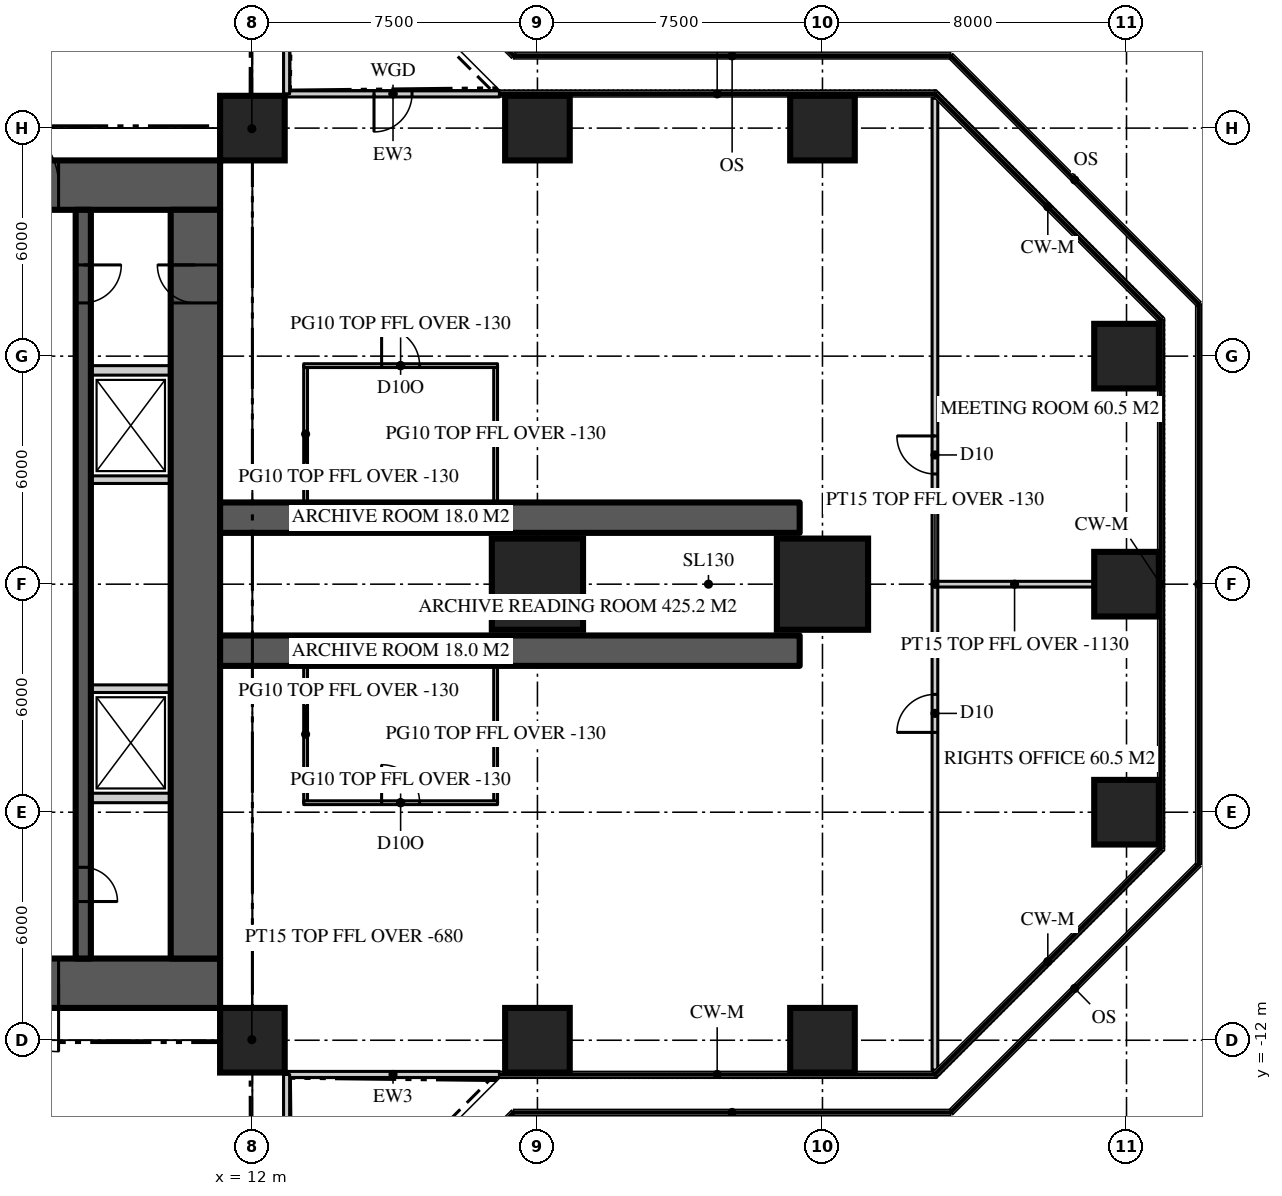
"""IFC4 building model, lengths in metres.
Left out: names, types, materials, properties, quantities, classifications, styles, units other than length and angle.
Written with IfcOpenShell. Run it as: python <this file> out.ifc"""

import sys

from ifc_helpers import new_model, si_unit, direction, frame, frame_2d, origin, origin_2d, place, context, subcontext, project, spatial, rectangle, extrude, element, fill, save


model = new_model("IFC4")
c1 = context("Model", 3, precision=1e-05, world=origin(), true_north=direction((0.0, 1.0)))
c2 = subcontext(c1, "Body", "Model", "MODEL_VIEW")
j1 = project(units=[si_unit("LENGTHUNIT", "METRE"), si_unit("PLANEANGLEUNIT", "RADIAN")], contexts=[c1])
p1 = place(None, origin())
s1 = spatial("IfcSite", under=j1, at=p1, CompositionType="ELEMENT")
p2 = place(p1, origin())
s2 = spatial("IfcBuilding", under=s1, at=p2, CompositionType="ELEMENT")
p3 = place(p2, frame((0.0, 0.0, 167.1)))
s3 = spatial("IfcBuildingStorey", under=s2, at=p3, CompositionType="ELEMENT", Elevation=167.1)
p4 = place(p3, frame((-11.15, 10.5, 0.0), z_axis=(0.0, 0.0, 1.0), x_axis=(1.0, 0.0, 0.0)))
e1 = element("IfcWall", 1, at=p4, inside=s3, PredefinedType="SHEAR", context=c2, shape_type="SweptSolid", body=[
    extrude(rectangle(XDim=22.3, YDim=1.3, at=frame_2d((11.15, 0.0))), origin(), (0.0, 0.0, 1.0), 3.9),
])
p5 = place(p4, frame((4.25, 0.0, 0.0)))
e2 = element("IfcOpeningElement", 2, at=p5, cuts=e1, PredefinedType="OPENING", context=c2, shape_type="SweptSolid", body=[
    extrude(rectangle(XDim=1.8, YDim=2.2, at=frame_2d((0.9, 1.1))), frame((0.0, 0.66, 0.0), z_axis=(0.0, -1.0, 0.0), x_axis=(1.0, 0.0, 0.0)), (0.0, 0.0, 1.0), 1.32),
])
p6 = place(p4, frame((16.25, 0.0, 0.0)))
e3 = element("IfcOpeningElement", 3, at=p6, cuts=e1, PredefinedType="OPENING", context=c2, shape_type="SweptSolid", body=[
    extrude(rectangle(XDim=1.8, YDim=2.2, at=frame_2d((0.9, 1.1))), frame((0.0, 0.66, 0.0), z_axis=(0.0, -1.0, 0.0), x_axis=(1.0, 0.0, 0.0)), (0.0, 0.0, 1.0), 1.32),
])
p7 = place(p3, frame((11.15, -10.5, 0.0), z_axis=(0.0, 0.0, 1.0), x_axis=(-1.0, 0.0, 0.0)))
e4 = element("IfcWall", 4, at=p7, inside=s3, PredefinedType="SHEAR", context=c2, shape_type="SweptSolid", body=[
    extrude(rectangle(XDim=22.3, YDim=1.3, at=frame_2d((11.15, 0.0))), origin(), (0.0, 0.0, 1.0), 3.9),
])
p8 = place(p7, frame((16.25, 0.0, 0.0)))
e5 = element("IfcOpeningElement", 5, at=p8, cuts=e4, PredefinedType="OPENING", context=c2, shape_type="SweptSolid", body=[
    extrude(rectangle(XDim=1.8, YDim=2.2, at=frame_2d((0.9, 1.1))), frame((0.0, 0.66, 0.0), z_axis=(0.0, -1.0, 0.0), x_axis=(1.0, 0.0, 0.0)), (0.0, 0.0, 1.0), 1.32),
])
p9 = place(p7, frame((4.25, 0.0, 0.0)))
e6 = element("IfcOpeningElement", 6, at=p9, cuts=e4, PredefinedType="OPENING", context=c2, shape_type="SweptSolid", body=[
    extrude(rectangle(XDim=1.8, YDim=2.2, at=frame_2d((0.9, 1.1))), frame((0.0, 0.66, 0.0), z_axis=(0.0, -1.0, 0.0), x_axis=(1.0, 0.0, 0.0)), (0.0, 0.0, 1.0), 1.32),
])
p10 = place(p3, frame((10.5, -9.85, 0.0), z_axis=(0.0, 0.0, 1.0), x_axis=(0.0, 1.0, 0.0)))
e7 = element("IfcWall", 7, at=p10, inside=s3, PredefinedType="SHEAR", context=c2, shape_type="SweptSolid", body=[
    extrude(rectangle(XDim=19.7, YDim=1.3, at=frame_2d((9.85, 0.0))), origin(), (0.0, 0.0, 1.0), 3.9),
])
p11 = place(p10, frame((17.25, 0.0, 0.0)))
e8 = element("IfcOpeningElement", 8, at=p11, cuts=e7, PredefinedType="OPENING", context=c2, shape_type="SweptSolid", body=[
    extrude(rectangle(XDim=1.0, YDim=2.2, at=frame_2d((0.5, 1.1))), frame((0.0, 0.66, 0.0), z_axis=(0.0, -1.0, 0.0), x_axis=(1.0, 0.0, 0.0)), (0.0, 0.0, 1.0), 1.32),
])
for number, where, z_axis, x_axis in (
    (9, (11.15, -1.75, 0.0), (0.0, 0.0, 1.0), (1.0, 0.0, 0.0)),
    (10, (11.15, 1.75, 0.0), (0.0, 0.0, 1.0), (1.0, 0.0, 0.0)),
):
    element("IfcWall", number, at=place(p3, frame(where, z_axis=z_axis, x_axis=x_axis)), inside=s3, PredefinedType="SHEAR", context=c2, shape_type="SweptSolid", body=[
        extrude(rectangle(XDim=15.25, YDim=0.8, at=frame_2d((7.625, 0.0))), origin(), (0.0, 0.0, 1.0), 3.9),
    ])
for number, where, z_axis, x_axis in (
    (11, (12.0, -12.0, 0.0), (0.0, 0.0, 1.0), (1.0, 0.0, 0.0)),
    (12, (19.5, -12.0, 0.0), (0.0, 0.0, 1.0), (1.0, 0.0, 0.0)),
    (13, (27.0, -12.0, 0.0), (0.0, 0.0, 1.0), (1.0, 0.0, 0.0)),
    (14, (35.0, -6.0, 0.0), (0.0, 0.0, 1.0), (1.0, 0.0, 0.0)),
):
    element("IfcColumn", number, at=place(p3, frame(where, z_axis=z_axis, x_axis=x_axis)), inside=s3, PredefinedType="COLUMN", context=c2, shape_type="SweptSolid", body=[
        extrude(rectangle(XDim=1.7, YDim=1.7, at=origin_2d()), origin(), (0.0, 0.0, 1.0), 3.9),
    ])
for number, where, z_axis, x_axis in (
    (15, (19.5, 0.0, 0.0), (0.0, 0.0, 1.0), (1.0, 0.0, 0.0)),
    (16, (27.0, 0.0, 0.0), (0.0, 0.0, 1.0), (1.0, 0.0, 0.0)),
):
    element("IfcColumn", number, at=place(p3, frame(where, z_axis=z_axis, x_axis=x_axis)), inside=s3, PredefinedType="COLUMN", context=c2, shape_type="SweptSolid", body=[
        extrude(rectangle(XDim=2.4, YDim=2.4, at=origin_2d()), origin(), (0.0, 0.0, 1.0), 3.9),
    ])
for number, where, z_axis, x_axis in (
    (17, (35.0, 0.0, 0.0), (0.0, 0.0, 1.0), (1.0, 0.0, 0.0)),
    (18, (35.0, 6.0, 0.0), (0.0, 0.0, 1.0), (1.0, 0.0, 0.0)),
    (19, (12.0, 12.0, 0.0), (0.0, 0.0, 1.0), (1.0, 0.0, 0.0)),
    (20, (19.5, 12.0, 0.0), (0.0, 0.0, 1.0), (1.0, 0.0, 0.0)),
    (21, (27.0, 12.0, 0.0), (0.0, 0.0, 1.0), (1.0, 0.0, 0.0)),
):
    element("IfcColumn", number, at=place(p3, frame(where, z_axis=z_axis, x_axis=x_axis)), inside=s3, PredefinedType="COLUMN", context=c2, shape_type="SweptSolid", body=[
        extrude(rectangle(XDim=1.7, YDim=1.7, at=origin_2d()), origin(), (0.0, 0.0, 1.0), 3.9),
    ])
p12 = place(p3, frame((12.9, -12.9, 0.0), z_axis=(0.0, 0.0, 1.0), x_axis=(1.0, 0.0, 0.0)))
e22 = element("IfcWall", 22, at=p12, inside=s3, PredefinedType="SOLIDWALL", context=c2, shape_type="SweptSolid", body=[
    extrude(rectangle(XDim=5.6, YDim=0.16, at=frame_2d((2.8, 0.0))), origin(), (0.0, 0.0, 1.0), 3.77),
])
p13 = place(p3, frame((18.5, 12.9, 0.0), z_axis=(0.0, 0.0, 1.0), x_axis=(-1.0, 0.0, 0.0)))
e23 = element("IfcWall", 23, at=p13, inside=s3, PredefinedType="SOLIDWALL", context=c2, shape_type="SweptSolid", body=[
    extrude(rectangle(XDim=5.6, YDim=0.16, at=frame_2d((2.8, 0.0))), origin(), (0.0, 0.0, 1.0), 3.77),
])
p14 = place(p13, frame((2.3, 0.0, 0.0)))
e24 = element("IfcOpeningElement", 24, at=p14, cuts=e23, PredefinedType="OPENING", context=c2, shape_type="SweptSolid", body=[
    extrude(rectangle(XDim=1.0, YDim=2.2, at=frame_2d((0.5, 1.1))), frame((0.0, 0.09, 0.0), z_axis=(0.0, -1.0, 0.0), x_axis=(1.0, 0.0, 0.0)), (0.0, 0.0, 1.0), 0.18),
])
p15 = place(p3, frame((12.9, 12.9, 0.0), z_axis=(0.0, 0.0, 1.0), x_axis=(0.0, 1.0, 0.0)))
e25 = element("IfcWall", 25, at=p15, inside=s3, PredefinedType="SOLIDWALL", context=c2, shape_type="SweptSolid", body=[
    extrude(rectangle(XDim=5.6, YDim=0.16, at=frame_2d((2.8, 0.0))), origin(), (0.0, 0.0, 1.0), 3.77),
])
p16 = place(p3, frame((12.9, -18.5, 0.0), z_axis=(0.0, 0.0, 1.0), x_axis=(0.0, 1.0, 0.0)))
e26 = element("IfcWall", 26, at=p16, inside=s3, PredefinedType="SOLIDWALL", context=c2, shape_type="SweptSolid", body=[
    extrude(rectangle(XDim=5.6, YDim=0.16, at=frame_2d((2.8, 0.0))), origin(), (0.0, 0.0, 1.0), 3.77),
])
p17 = place(p16, frame((2.3, 0.0, 0.0)))
e27 = element("IfcOpeningElement", 27, at=p17, cuts=e26, PredefinedType="OPENING", context=c2, shape_type="SweptSolid", body=[
    extrude(rectangle(XDim=1.0, YDim=2.2, at=frame_2d((0.5, 1.1))), frame((0.0, 0.09, 0.0), z_axis=(0.0, -1.0, 0.0), x_axis=(1.0, 0.0, 0.0)), (0.0, 0.0, 1.0), 0.18),
])
p18 = place(p3, frame((7.55, 9.85, 0.0), z_axis=(0.0, 0.0, 1.0), x_axis=(0.0, -1.0, 0.0)))
e28 = element("IfcWall", 28, at=p18, inside=s3, PredefinedType="SHEAR", context=c2, shape_type="SweptSolid", body=[
    extrude(rectangle(XDim=19.7, YDim=0.4, at=frame_2d((9.85, 0.0))), origin(), (0.0, 0.0, 1.0), 3.9),
])
p19 = place(p18, frame((1.45, 0.0, 0.0)))
e29 = element("IfcOpeningElement", 29, at=p19, cuts=e28, PredefinedType="OPENING", context=c2, shape_type="SweptSolid", body=[
    extrude(rectangle(XDim=1.0, YDim=2.2, at=frame_2d((0.5, 1.1))), frame((0.0, 0.21, 0.0), z_axis=(0.0, -1.0, 0.0), x_axis=(1.0, 0.0, 0.0)), (0.0, 0.0, 1.0), 0.42),
])
p20 = place(p18, frame((17.3, 0.0, 0.0)))
e30 = element("IfcOpeningElement", 30, at=p20, cuts=e28, PredefinedType="OPENING", context=c2, shape_type="SweptSolid", body=[
    extrude(rectangle(XDim=0.9, YDim=2.1, at=frame_2d((0.45, 1.05))), frame((0.0, 0.21, 0.0), z_axis=(0.0, -1.0, 0.0), x_axis=(1.0, 0.0, 0.0)), (0.0, 0.0, 1.0), 0.42),
])
for number, where, z_axis, x_axis in (
    (31, (7.75, 5.625, 0.0), (0.0, 0.0, 1.0), (1.0, 0.0, 0.0)),
    (32, (7.75, -5.625, 0.0), (0.0, 0.0, 1.0), (1.0, 0.0, 0.0)),
):
    element("IfcWall", number, at=place(p3, frame(where, z_axis=z_axis, x_axis=x_axis)), inside=s3, PredefinedType="SOLIDWALL", context=c2, shape_type="SweptSolid", body=[
        extrude(rectangle(XDim=2.1, YDim=0.25, at=frame_2d((1.05, 0.0))), origin(), (0.0, 0.0, 1.0), 3.7),
    ])
for number, where, z_axis, x_axis in (
    (33, (7.75, -2.75, 0.0), (0.0, 0.0, 1.0), (1.0, 0.0, 0.0)),
    (34, (7.75, 2.75, 0.0), (0.0, 0.0, 1.0), (1.0, 0.0, 0.0)),
):
    element("IfcWall", number, at=place(p3, frame(where, z_axis=z_axis, x_axis=x_axis)), inside=s3, PredefinedType="SOLIDWALL", context=c2, shape_type="SweptSolid", body=[
        extrude(rectangle(XDim=2.1, YDim=0.2, at=frame_2d((1.05, 0.0))), origin(), (0.0, 0.0, 1.0), 3.7),
    ])
p21 = place(p3, frame((29.959, -12.786, 0.0), z_axis=(0.0, 0.0, 1.0), x_axis=(0.0, 1.0, 0.0)))
e35 = element("IfcWall", 35, at=p21, inside=s3, PredefinedType="PARTITIONING", context=c2, shape_type="SweptSolid", body=[
    extrude(rectangle(XDim=25.573, YDim=0.15, at=frame_2d((12.786, 0.0))), origin(), (0.0, 0.0, 1.0), 3.77),
])
p22 = place(p21, frame((15.687, 0.0, 0.0)))
e36 = element("IfcOpeningElement", 36, at=p22, cuts=e35, PredefinedType="OPENING", context=c2, shape_type="SweptSolid", body=[
    extrude(rectangle(XDim=1.0, YDim=2.2, at=frame_2d((0.5, 1.1))), frame((0.0, 0.085, 0.0), z_axis=(0.0, -1.0, 0.0), x_axis=(1.0, 0.0, 0.0)), (0.0, 0.0, 1.0), 0.17),
])
p23 = place(p21, frame((8.886, 0.0, 0.0)))
e37 = element("IfcOpeningElement", 37, at=p23, cuts=e35, PredefinedType="OPENING", context=c2, shape_type="SweptSolid", body=[
    extrude(rectangle(XDim=1.0, YDim=2.2, at=frame_2d((0.5, 1.1))), frame((0.0, 0.085, 0.0), z_axis=(0.0, -1.0, 0.0), x_axis=(1.0, 0.0, 0.0)), (0.0, 0.0, 1.0), 0.17),
])
p24 = place(p3, frame((29.959, 0.0, 0.0), z_axis=(0.0, 0.0, 1.0), x_axis=(1.0, 0.0, 0.0)))
e38 = element("IfcWall", 38, at=p24, inside=s3, PredefinedType="PARTITIONING", context=c2, shape_type="SweptSolid", body=[
    extrude(rectangle(XDim=4.191, YDim=0.15, at=frame_2d((2.095, 0.0))), origin(), (0.0, 0.0, 1.0), 2.77),
])
for number, where, z_axis, x_axis in (
    (39, (13.4, 2.15, 0.0), (0.0, 0.0, 1.0), (0.0, 1.0, 0.0)),
    (40, (18.4, 2.15, 0.0), (0.0, 0.0, 1.0), (0.0, 1.0, 0.0)),
):
    element("IfcWall", number, at=place(p3, frame(where, z_axis=z_axis, x_axis=x_axis)), inside=s3, PredefinedType="PARTITIONING", context=c2, shape_type="SweptSolid", body=[
        extrude(rectangle(XDim=3.6, YDim=0.1, at=frame_2d((1.8, 0.0))), origin(), (0.0, 0.0, 1.0), 3.77),
    ])
p25 = place(p3, frame((13.35, 5.75, 0.0), z_axis=(0.0, 0.0, 1.0), x_axis=(1.0, 0.0, 0.0)))
e41 = element("IfcWall", 41, at=p25, inside=s3, PredefinedType="PARTITIONING", context=c2, shape_type="SweptSolid", body=[
    extrude(rectangle(XDim=5.1, YDim=0.1, at=frame_2d((2.55, 0.0))), origin(), (0.0, 0.0, 1.0), 3.77),
])
p26 = place(p25, frame((2.05, 0.0, 0.0)))
e42 = element("IfcOpeningElement", 42, at=p26, cuts=e41, PredefinedType="OPENING", context=c2, shape_type="SweptSolid", body=[
    extrude(rectangle(XDim=1.0, YDim=2.2, at=frame_2d((0.5, 1.1))), frame((0.0, 0.06, 0.0), z_axis=(0.0, -1.0, 0.0), x_axis=(1.0, 0.0, 0.0)), (0.0, 0.0, 1.0), 0.12),
])
for number, where, z_axis, x_axis in (
    (43, (13.4, -2.15, 0.0), (0.0, 0.0, 1.0), (0.0, -1.0, 0.0)),
    (44, (18.4, -2.15, 0.0), (0.0, 0.0, 1.0), (0.0, -1.0, 0.0)),
):
    element("IfcWall", number, at=place(p3, frame(where, z_axis=z_axis, x_axis=x_axis)), inside=s3, PredefinedType="PARTITIONING", context=c2, shape_type="SweptSolid", body=[
        extrude(rectangle(XDim=3.6, YDim=0.1, at=frame_2d((1.8, 0.0))), origin(), (0.0, 0.0, 1.0), 3.77),
    ])
p27 = place(p3, frame((13.35, -5.75, 0.0), z_axis=(0.0, 0.0, 1.0), x_axis=(1.0, 0.0, 0.0)))
e45 = element("IfcWall", 45, at=p27, inside=s3, PredefinedType="PARTITIONING", context=c2, shape_type="SweptSolid", body=[
    extrude(rectangle(XDim=5.1, YDim=0.1, at=frame_2d((2.55, 0.0))), origin(), (0.0, 0.0, 1.0), 3.77),
])
p28 = place(p27, frame((2.05, 0.0, 0.0)))
e46 = element("IfcOpeningElement", 46, at=p28, cuts=e45, PredefinedType="OPENING", context=c2, shape_type="SweptSolid", body=[
    extrude(rectangle(XDim=1.0, YDim=2.2, at=frame_2d((0.5, 1.1))), frame((0.0, 0.06, 0.0), z_axis=(0.0, -1.0, 0.0), x_axis=(1.0, 0.0, 0.0)), (0.0, 0.0, 1.0), 0.12),
])
for number, where, z_axis, x_axis in (
    (47, (11.15, 11.15, 0.0), (0.0, 0.0, 1.0), (0.707, 0.707, 0.0)),
    (48, (11.15, -11.15, 0.0), (0.0, 0.0, 1.0), (0.707, -0.707, 0.0)),
):
    element("IfcWall", number, at=place(p3, frame(where, z_axis=z_axis, x_axis=x_axis)), inside=s3, PredefinedType="PARTITIONING", context=c2, shape_type="SweptSolid", body=[
        extrude(rectangle(XDim=2.362, YDim=0.15, at=frame_2d((1.181, 0.0))), origin(), (0.0, 0.0, 1.0), 3.22),
    ])
p29 = place(p14, origin())
e49 = element("IfcDoor", 49, at=p29, inside=s3, OperationType="SINGLE_SWING_RIGHT", PredefinedType="DOOR", context=c2, shape_type="SweptSolid", body=[
    extrude(rectangle(XDim=1.0, YDim=2.2, at=frame_2d((0.5, 1.1))), frame((0.0, 0.025, 0.0), z_axis=(0.0, -1.0, 0.0), x_axis=(1.0, 0.0, 0.0)), (0.0, 0.0, 1.0), 0.05),
])
fill(e24, e49)
p30 = place(p6, origin())
e50 = element("IfcDoor", 50, at=p30, inside=s3, OperationType="DOUBLE_DOOR_DOUBLE_SWING", PredefinedType="DOOR", context=c2, shape_type="SweptSolid", body=[
    extrude(rectangle(XDim=1.8, YDim=2.2, at=frame_2d((0.9, 1.1))), frame((0.0, 0.025, 0.0), z_axis=(0.0, -1.0, 0.0), x_axis=(1.0, 0.0, 0.0)), (0.0, 0.0, 1.0), 0.05),
])
fill(e3, e50)
p31 = place(p9, origin())
e51 = element("IfcDoor", 51, at=p31, inside=s3, OperationType="DOUBLE_DOOR_DOUBLE_SWING", PredefinedType="DOOR", context=c2, shape_type="SweptSolid", body=[
    extrude(rectangle(XDim=1.8, YDim=2.2, at=frame_2d((0.9, 1.1))), frame((0.0, 0.025, 0.0), z_axis=(0.0, -1.0, 0.0), x_axis=(1.0, 0.0, 0.0)), (0.0, 0.0, 1.0), 0.05),
])
fill(e6, e51)
p32 = place(p19, origin())
e52 = element("IfcDoor", 52, at=p32, inside=s3, OperationType="SINGLE_SWING_LEFT", PredefinedType="DOOR", context=c2, shape_type="SweptSolid", body=[
    extrude(rectangle(XDim=1.0, YDim=2.2, at=frame_2d((0.5, 1.1))), frame((0.0, 0.025, 0.0), z_axis=(0.0, -1.0, 0.0), x_axis=(1.0, 0.0, 0.0)), (0.0, 0.0, 1.0), 0.05),
])
fill(e29, e52)
p33 = place(p11, origin())
e53 = element("IfcDoor", 53, at=p33, inside=s3, OperationType="SINGLE_SWING_RIGHT", PredefinedType="DOOR", context=c2, shape_type="SweptSolid", body=[
    extrude(rectangle(XDim=1.0, YDim=2.2, at=frame_2d((0.5, 1.1))), frame((0.0, 0.025, 0.0), z_axis=(0.0, -1.0, 0.0), x_axis=(1.0, 0.0, 0.0)), (0.0, 0.0, 1.0), 0.05),
])
fill(e8, e53)
p34 = place(p20, origin())
e54 = element("IfcDoor", 54, at=p34, inside=s3, OperationType="SINGLE_SWING_RIGHT", PredefinedType="DOOR", context=c2, shape_type="SweptSolid", body=[
    extrude(rectangle(XDim=0.9, YDim=2.1, at=frame_2d((0.45, 1.05))), frame((0.0, 0.025, 0.0), z_axis=(0.0, -1.0, 0.0), x_axis=(1.0, 0.0, 0.0)), (0.0, 0.0, 1.0), 0.05),
])
fill(e30, e54)
p35 = place(p22, origin())
e55 = element("IfcDoor", 55, at=p35, inside=s3, OperationType="SINGLE_SWING_RIGHT", PredefinedType="DOOR", context=c2, shape_type="SweptSolid", body=[
    extrude(rectangle(XDim=1.0, YDim=2.2, at=frame_2d((0.5, 1.1))), frame((0.0, 0.025, 0.0), z_axis=(0.0, -1.0, 0.0), x_axis=(1.0, 0.0, 0.0)), (0.0, 0.0, 1.0), 0.05),
])
fill(e36, e55)
p36 = place(p23, origin())
e56 = element("IfcDoor", 56, at=p36, inside=s3, OperationType="SINGLE_SWING_LEFT", PredefinedType="DOOR", context=c2, shape_type="SweptSolid", body=[
    extrude(rectangle(XDim=1.0, YDim=2.2, at=frame_2d((0.5, 1.1))), frame((0.0, 0.025, 0.0), z_axis=(0.0, -1.0, 0.0), x_axis=(1.0, 0.0, 0.0)), (0.0, 0.0, 1.0), 0.05),
])
fill(e37, e56)
p37 = place(p26, origin())
e57 = element("IfcDoor", 57, at=p37, inside=s3, OperationType="SINGLE_SWING_LEFT", PredefinedType="DOOR", context=c2, shape_type="SweptSolid", body=[
    extrude(rectangle(XDim=1.0, YDim=2.2, at=frame_2d((0.5, 1.1))), frame((0.0, 0.025, 0.0), z_axis=(0.0, -1.0, 0.0), x_axis=(1.0, 0.0, 0.0)), (0.0, 0.0, 1.0), 0.05),
])
fill(e42, e57)
p38 = place(p28, origin())
e58 = element("IfcDoor", 58, at=p38, inside=s3, OperationType="SINGLE_SWING_LEFT", PredefinedType="DOOR", context=c2, shape_type="SweptSolid", body=[
    extrude(rectangle(XDim=1.0, YDim=2.2, at=frame_2d((0.5, 1.1))), frame((0.0, 0.025, 0.0), z_axis=(0.0, -1.0, 0.0), x_axis=(1.0, 0.0, 0.0)), (0.0, 0.0, 1.0), 0.05),
])
fill(e46, e58)
save(model, sys.argv[1])
